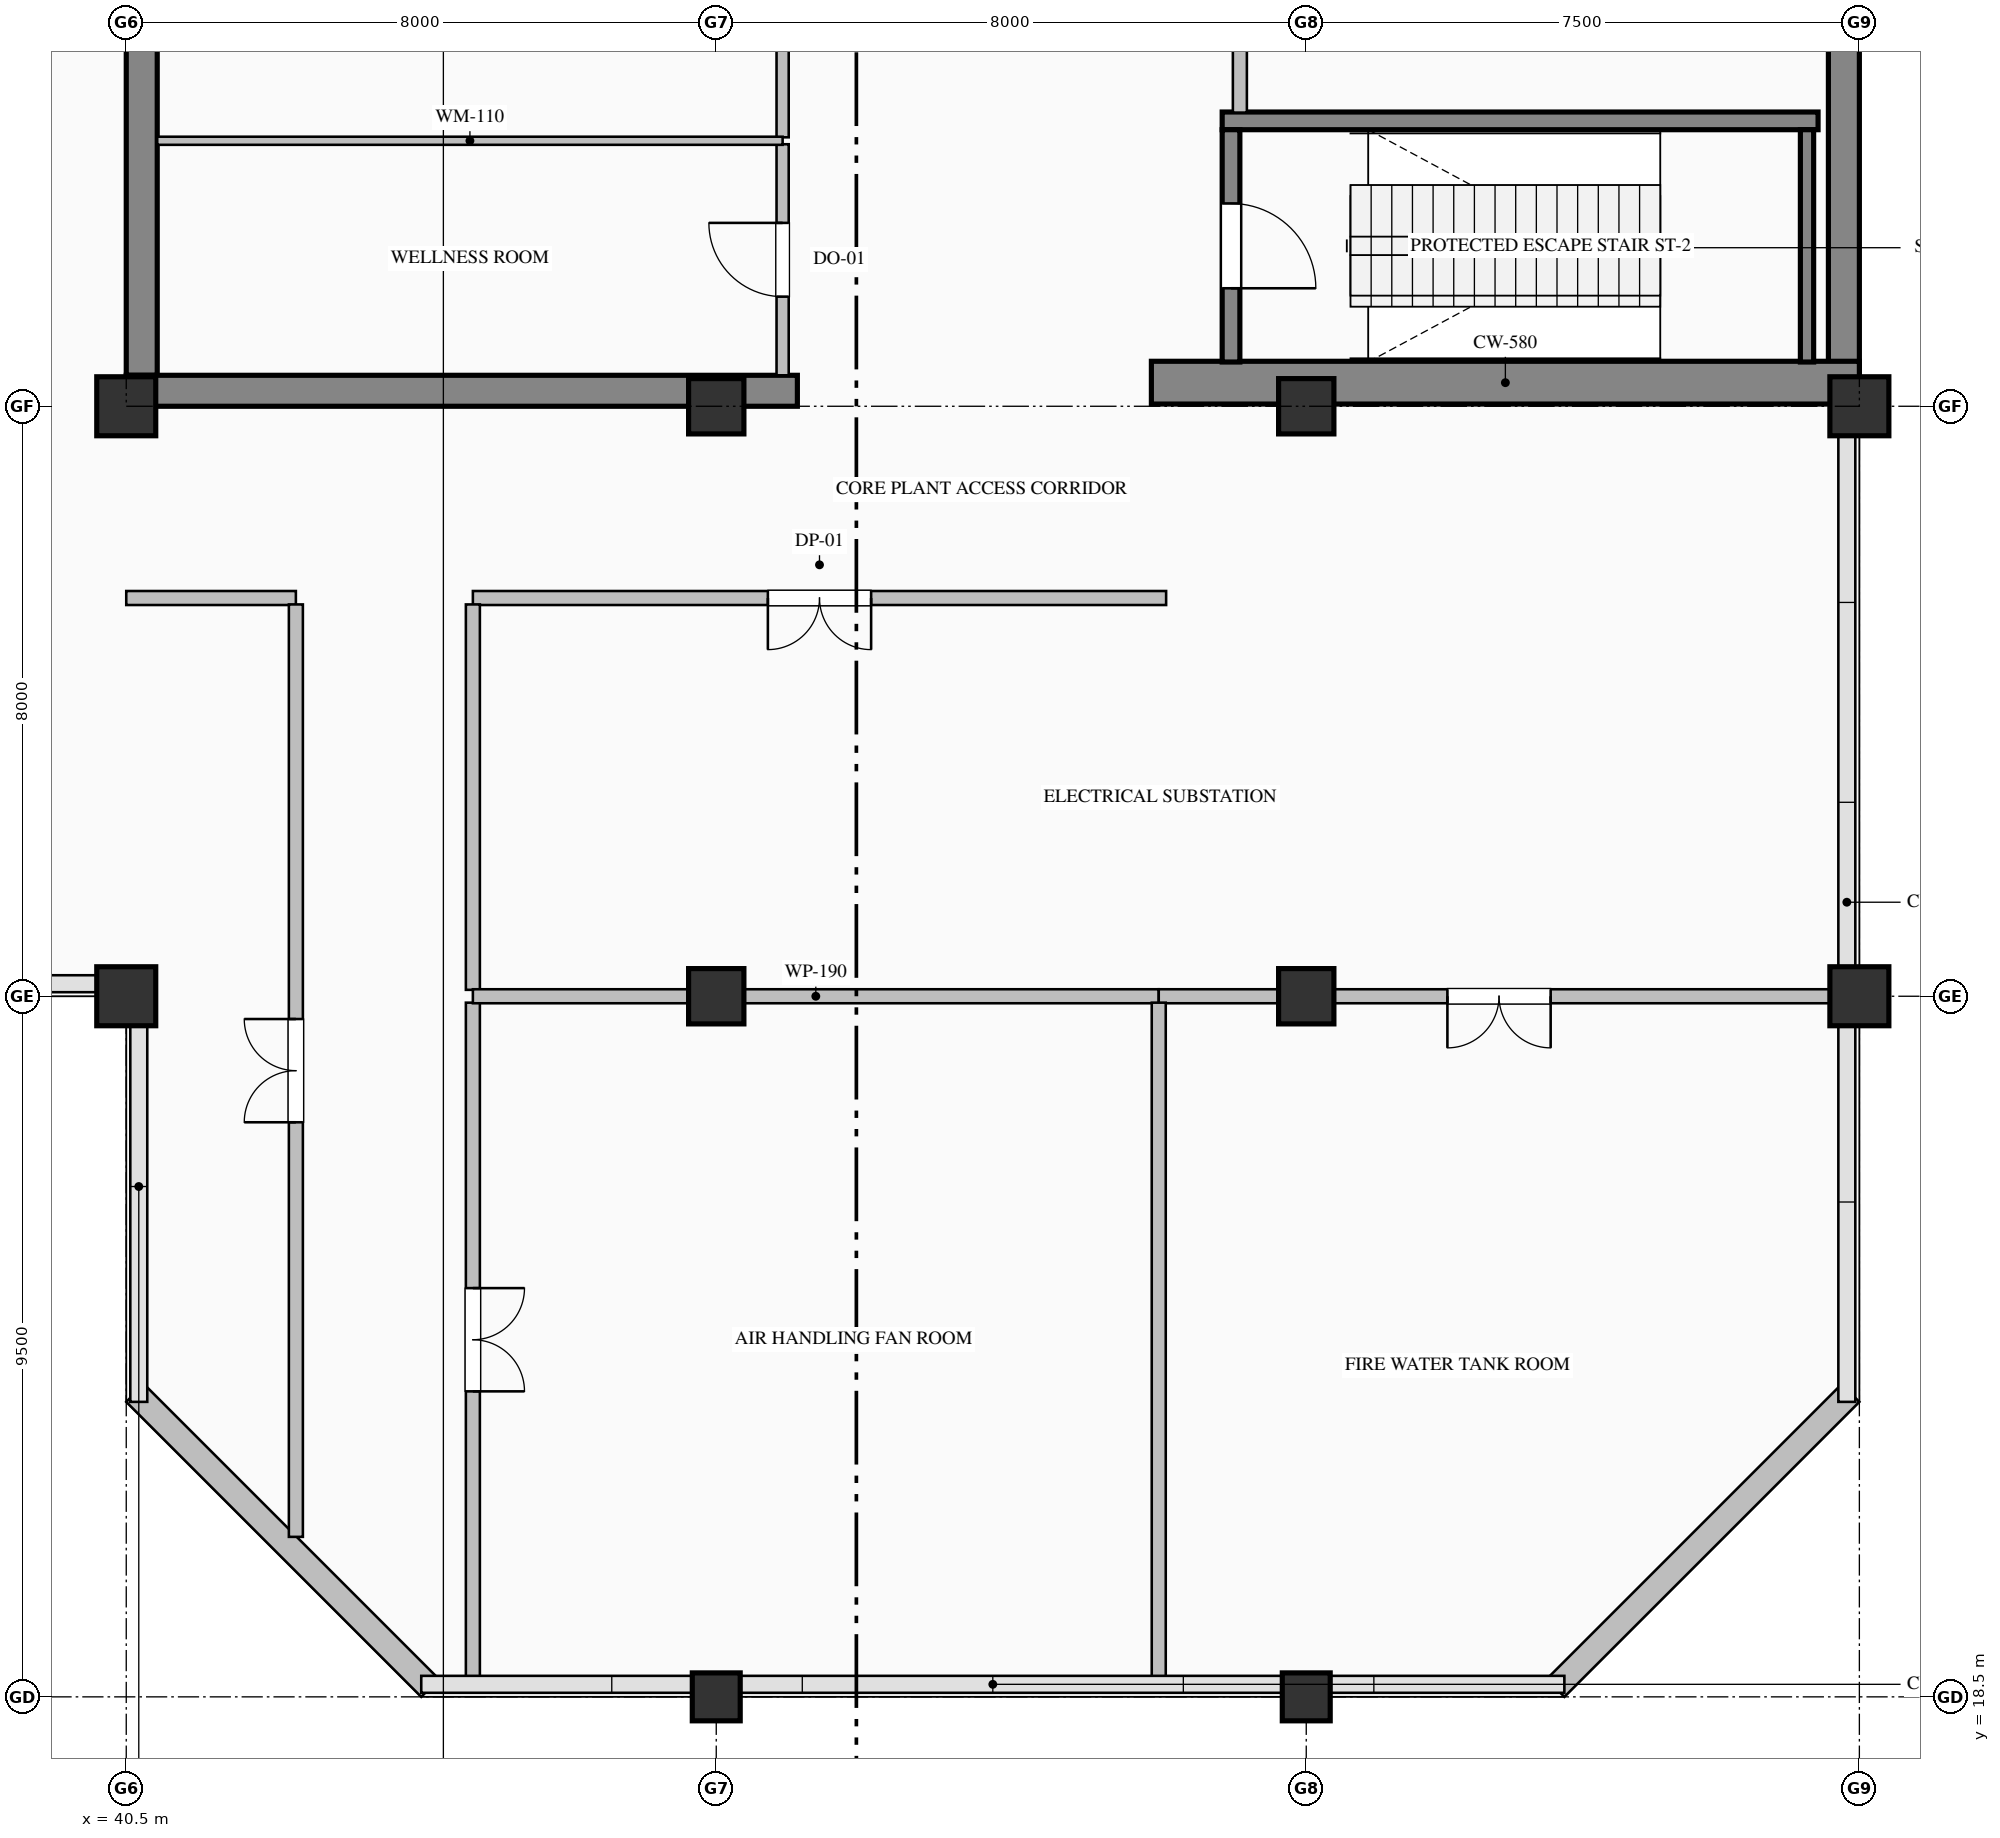
"""IFC4 building model, lengths in metres.
Left out: names, types, materials, properties, quantities, classifications, styles, units other than length and angle.
Written with IfcOpenShell. Run it as: python <this file> out.ifc"""

import sys

from ifc_helpers import new_model, si_unit, direction, frame, frame_2d, origin, origin_2d, place, context, subcontext, project, spatial, rectangle, hollow_rectangle, extrude, element, fill, save


model = new_model("IFC4")
c1 = context("Model", 3, precision=1e-05, world=origin(), true_north=direction((0.0, 1.0)))
c2 = subcontext(c1, "Body", "Model", "MODEL_VIEW")
j1 = project(units=[si_unit("LENGTHUNIT", "METRE"), si_unit("PLANEANGLEUNIT", "RADIAN")], contexts=[c1])
p1 = place(None, origin())
s1 = spatial("IfcSite", under=j1, at=p1, CompositionType="ELEMENT")
p2 = place(p1, origin())
s2 = spatial("IfcBuilding", under=s1, at=p2, CompositionType="ELEMENT")
p3 = place(p2, frame((0.0, 0.0, 367.2)))
s3 = spatial("IfcBuildingStorey", under=s2, at=p3, CompositionType="ELEMENT", Elevation=367.2)
p4 = place(p3, frame((63.79, 36.32, 0.0), z_axis=(0.0, 0.0, 1.0), x_axis=(0.0, 1.0, 0.0)))
e1 = element("IfcWall", 1, at=p4, inside=s3, PredefinedType="SHEAR", context=c2, shape_type="SweptSolid", body=[
    extrude(rectangle(XDim=15.26, YDim=0.42, at=frame_2d((7.63, 0.0))), origin(), (0.0, 0.0, 1.0), 5.39),
])
p5 = place(p3, frame((40.71, 36.42, 0.0), z_axis=(0.0, 0.0, 1.0), x_axis=(0.0, 1.0, 0.0)))
e2 = element("IfcWall", 2, at=p5, inside=s3, PredefinedType="SHEAR", context=c2, shape_type="SweptSolid", body=[
    extrude(rectangle(XDim=7.98, YDim=0.42, at=frame_2d((3.99, 0.0))), origin(), (0.0, 0.0, 1.0), 5.39),
])
p6 = place(p3, frame((40.5, 36.21, 0.0), z_axis=(0.0, 0.0, 1.0), x_axis=(1.0, 0.0, 0.0)))
e3 = element("IfcWall", 3, at=p6, inside=s3, PredefinedType="SHEAR", context=c2, shape_type="SweptSolid", body=[
    extrude(rectangle(XDim=9.1, YDim=0.42, at=frame_2d((4.55, 0.0))), origin(), (0.0, 0.0, 1.0), 5.39),
])
p7 = place(p3, frame((54.4, 36.32, 0.0), z_axis=(0.0, 0.0, 1.0), x_axis=(1.0, 0.0, 0.0)))
e4 = element("IfcWall", 4, at=p7, inside=s3, PredefinedType="SHEAR", context=c2, shape_type="SweptSolid", body=[
    extrude(rectangle(XDim=9.6, YDim=0.58, at=frame_2d((4.8, 0.0))), origin(), (0.0, 0.0, 1.0), 5.8),
])
for number, where, z_axis, x_axis in (
    (5, (40.5, 28.0, 0.0), (0.0, 0.0, 1.0), (1.0, 0.0, 0.0)),
    (6, (40.5, 36.0, 0.0), (0.0, 0.0, 1.0), (1.0, 0.0, 0.0)),
):
    element("IfcColumn", number, at=place(p3, frame(where, z_axis=z_axis, x_axis=x_axis)), inside=s3, PredefinedType="COLUMN", context=c2, shape_type="SweptSolid", body=[
        extrude(hollow_rectangle(XDim=0.8, YDim=0.8, WallThickness=0.032, at=origin_2d()), origin(), (0.0, 0.0, 1.0), 5.8),
    ])
p8 = place(p3, frame((48.5, 18.5, 0.0), z_axis=(0.0, 0.0, 1.0), x_axis=(1.0, 0.0, 0.0)))
e7 = element("IfcColumn", 7, at=p8, inside=s3, PredefinedType="COLUMN", context=c2, shape_type="SweptSolid", body=[
    extrude(hollow_rectangle(XDim=0.65, YDim=0.65, WallThickness=0.028, at=origin_2d()), origin(), (0.0, 0.0, 1.0), 5.8),
])
for number, where, z_axis, x_axis in (
    (8, (48.5, 28.0, 0.0), (0.0, 0.0, 1.0), (1.0, 0.0, 0.0)),
    (9, (48.5, 36.0, 0.0), (0.0, 0.0, 1.0), (1.0, 0.0, 0.0)),
):
    element("IfcColumn", number, at=place(p3, frame(where, z_axis=z_axis, x_axis=x_axis)), inside=s3, PredefinedType="COLUMN", context=c2, shape_type="SweptSolid", body=[
        extrude(rectangle(XDim=0.75, YDim=0.75, at=origin_2d()), origin(), (0.0, 0.0, 1.0), 5.8),
    ])
p9 = place(p3, frame((56.5, 18.5, 0.0), z_axis=(0.0, 0.0, 1.0), x_axis=(1.0, 0.0, 0.0)))
e10 = element("IfcColumn", 10, at=p9, inside=s3, PredefinedType="COLUMN", context=c2, shape_type="SweptSolid", body=[
    extrude(hollow_rectangle(XDim=0.65, YDim=0.65, WallThickness=0.028, at=origin_2d()), origin(), (0.0, 0.0, 1.0), 5.8),
])
for number, where, z_axis, x_axis in (
    (11, (56.5, 28.0, 0.0), (0.0, 0.0, 1.0), (1.0, 0.0, 0.0)),
    (12, (56.5, 36.0, 0.0), (0.0, 0.0, 1.0), (1.0, 0.0, 0.0)),
):
    element("IfcColumn", number, at=place(p3, frame(where, z_axis=z_axis, x_axis=x_axis)), inside=s3, PredefinedType="COLUMN", context=c2, shape_type="SweptSolid", body=[
        extrude(rectangle(XDim=0.75, YDim=0.75, at=origin_2d()), origin(), (0.0, 0.0, 1.0), 5.8),
    ])
for number, where, z_axis, x_axis in (
    (13, (64.0, 28.0, 0.0), (0.0, 0.0, 1.0), (1.0, 0.0, 0.0)),
    (14, (64.0, 36.0, 0.0), (0.0, 0.0, 1.0), (1.0, 0.0, 0.0)),
):
    element("IfcColumn", number, at=place(p3, frame(where, z_axis=z_axis, x_axis=x_axis)), inside=s3, PredefinedType="COLUMN", context=c2, shape_type="SweptSolid", body=[
        extrude(hollow_rectangle(XDim=0.8, YDim=0.8, WallThickness=0.032, at=origin_2d()), origin(), (0.0, 0.0, 1.0), 5.8),
    ])
for number, where, z_axis, x_axis in (
    (15, (63.88, 22.62, 0.0), (0.0, 0.0, 1.0), (-0.707, -0.707, 0.0)),
    (16, (44.62, 18.62, 0.0), (0.0, 0.0, 1.0), (-0.707, 0.707, 0.0)),
):
    element("IfcWall", number, at=place(p3, frame(where, z_axis=z_axis, x_axis=x_axis)), inside=s3, PredefinedType="SOLIDWALL", context=c2, shape_type="SweptSolid", body=[
        extrude(rectangle(XDim=5.657, YDim=0.34, at=frame_2d((2.828, 0.0))), origin(), (0.0, 0.0, 1.0), 5.39),
    ])
p10 = place(p3, frame((55.36, 39.87, 0.0), z_axis=(0.0, 0.0, 1.0), x_axis=(1.0, 0.0, 0.0)))
e17 = element("IfcWall", 17, at=p10, inside=s3, PredefinedType="SOLIDWALL", context=c2, shape_type="SweptSolid", body=[
    extrude(rectangle(XDim=8.08, YDim=0.24, at=frame_2d((4.04, 0.0))), origin(), (0.0, 0.0, 1.0), 5.8),
])
p11 = place(p3, frame((55.48, 39.75, 0.0), z_axis=(0.0, 0.0, 1.0), x_axis=(0.0, -1.0, 0.0)))
e18 = element("IfcWall", 18, at=p11, inside=s3, PredefinedType="SOLIDWALL", context=c2, shape_type="SweptSolid", body=[
    extrude(rectangle(XDim=3.15, YDim=0.24, at=frame_2d((1.575, 0.0))), origin(), (0.0, 0.0, 1.0), 5.8),
])
p12 = place(p11, frame((1.0, 0.0, 0.0)))
e19 = element("IfcOpeningElement", 19, at=p12, cuts=e18, PredefinedType="OPENING", context=c2, shape_type="SweptSolid", body=[
    extrude(rectangle(XDim=1.15, YDim=2.2, at=frame_2d((0.575, 1.1))), frame((0.0, 0.13, 0.0), z_axis=(0.0, -1.0, 0.0), x_axis=(1.0, 0.0, 0.0)), (0.0, 0.0, 1.0), 0.26),
])
p13 = place(p3, frame((63.29, 36.6, 0.0), z_axis=(0.0, 0.0, 1.0), x_axis=(0.0, 1.0, 0.0)))
e20 = element("IfcWall", 20, at=p13, inside=s3, PredefinedType="SOLIDWALL", context=c2, shape_type="SweptSolid", body=[
    extrude(rectangle(XDim=3.15, YDim=0.18, at=frame_2d((1.575, 0.0))), origin(), (0.0, 0.0, 1.0), 5.8),
])
p14 = place(p3, frame((49.4, 36.42, 0.0), z_axis=(0.0, 0.0, 1.0), x_axis=(0.0, 1.0, 0.0)))
e21 = element("IfcWall", 21, at=p14, inside=s3, PredefinedType="PARTITIONING", context=c2, shape_type="SweptSolid", body=[
    extrude(rectangle(XDim=3.133, YDim=0.165, at=frame_2d((1.566, 0.0))), origin(), (0.0, 0.0, 1.0), 4.632),
])
p15 = place(p14, frame((1.066, 0.0, 0.0)))
e22 = element("IfcOpeningElement", 22, at=p15, cuts=e21, PredefinedType="OPENING", context=c2, shape_type="SweptSolid", body=[
    extrude(rectangle(XDim=1.0, YDim=2.15, at=frame_2d((0.5, 1.075))), frame((0.0, 0.093, 0.0), z_axis=(0.0, -1.0, 0.0), x_axis=(1.0, 0.0, 0.0)), (0.0, 0.0, 1.0), 0.185),
])
p16 = place(p3, frame((49.4, 39.647, 0.0), z_axis=(0.0, 0.0, 1.0), x_axis=(0.0, 1.0, 0.0)))
e23 = element("IfcWall", 23, at=p16, inside=s3, PredefinedType="PARTITIONING", context=c2, shape_type="SweptSolid", body=[
    extrude(rectangle(XDim=4.503, YDim=0.165, at=frame_2d((2.251, 0.0))), origin(), (0.0, 0.0, 1.0), 4.632),
])
p17 = place(p16, frame((1.802, 0.0, 0.0)))
e24 = element("IfcOpeningElement", 24, at=p17, cuts=e23, PredefinedType="OPENING", context=c2, shape_type="SweptSolid", body=[
    extrude(rectangle(XDim=0.9, YDim=2.15, at=frame_2d((0.45, 1.075))), frame((0.0, 0.093, 0.0), z_axis=(0.0, -1.0, 0.0), x_axis=(1.0, 0.0, 0.0)), (0.0, 0.0, 1.0), 0.185),
])
p18 = place(p3, frame((55.6, 42.713, 0.0), z_axis=(0.0, 0.0, 1.0), x_axis=(0.0, -1.0, 0.0)))
e25 = element("IfcWall", 25, at=p18, inside=s3, PredefinedType="PARTITIONING", context=c2, shape_type="SweptSolid", body=[
    extrude(rectangle(XDim=2.731, YDim=0.19, at=frame_2d((1.365, 0.0))), origin(), (0.0, 0.0, 1.0), 5.39),
])
p19 = place(p3, frame((40.92, 39.6, 0.0), z_axis=(0.0, 0.0, 1.0), x_axis=(1.0, 0.0, 0.0)))
e26 = element("IfcWall", 26, at=p19, inside=s3, PredefinedType="MOVABLE", context=c2, shape_type="SweptSolid", body=[
    extrude(rectangle(XDim=8.48, YDim=0.11, at=frame_2d((4.24, 0.0))), origin(), (0.0, 0.0, 1.0), 5.39),
])
p20 = place(p3, frame((54.6, 33.4, 0.0), z_axis=(0.0, 0.0, 1.0), x_axis=(-1.0, 0.0, 0.0)))
e27 = element("IfcWall", 27, at=p20, inside=s3, PredefinedType="PARTITIONING", context=c2, shape_type="SweptSolid", body=[
    extrude(rectangle(XDim=9.4, YDim=0.19, at=frame_2d((4.7, 0.0))), origin(), (0.0, 0.0, 1.0), 5.39),
])
p21 = place(p20, frame((4.0, 0.0, 0.0)))
e28 = element("IfcOpeningElement", 28, at=p21, cuts=e27, PredefinedType="OPENING", context=c2, shape_type="SweptSolid", body=[
    extrude(rectangle(XDim=1.4, YDim=2.25, at=frame_2d((0.7, 1.125))), frame((0.0, 0.105, 0.0), z_axis=(0.0, -1.0, 0.0), x_axis=(1.0, 0.0, 0.0)), (0.0, 0.0, 1.0), 0.21),
])
p22 = place(p3, frame((42.8, 33.4, 0.0), z_axis=(0.0, 0.0, 1.0), x_axis=(-1.0, 0.0, 0.0)))
e29 = element("IfcWall", 29, at=p22, inside=s3, PredefinedType="PARTITIONING", context=c2, shape_type="SweptSolid", body=[
    extrude(rectangle(XDim=2.3, YDim=0.19, at=frame_2d((1.15, 0.0))), origin(), (0.0, 0.0, 1.0), 5.39),
])
p23 = place(p3, frame((45.2, 33.313, 0.0), z_axis=(0.0, 0.0, 1.0), x_axis=(0.0, -1.0, 0.0)))
e30 = element("IfcWall", 30, at=p23, inside=s3, PredefinedType="PARTITIONING", context=c2, shape_type="SweptSolid", body=[
    extrude(rectangle(XDim=5.226, YDim=0.19, at=frame_2d((2.613, 0.0))), origin(), (0.0, 0.0, 1.0), 5.39),
])
p24 = place(p3, frame((45.2, 27.913, 0.0), z_axis=(0.0, 0.0, 1.0), x_axis=(0.0, -1.0, 0.0)))
e31 = element("IfcWall", 31, at=p24, inside=s3, PredefinedType="PARTITIONING", context=c2, shape_type="SweptSolid", body=[
    extrude(rectangle(XDim=9.141, YDim=0.19, at=frame_2d((4.571, 0.0))), origin(), (0.0, 0.0, 1.0), 5.39),
])
p25 = place(p24, frame((3.871, 0.0, 0.0)))
e32 = element("IfcOpeningElement", 32, at=p25, cuts=e31, PredefinedType="OPENING", context=c2, shape_type="SweptSolid", body=[
    extrude(rectangle(XDim=1.4, YDim=2.25, at=frame_2d((0.7, 1.125))), frame((0.0, 0.105, 0.0), z_axis=(0.0, -1.0, 0.0), x_axis=(1.0, 0.0, 0.0)), (0.0, 0.0, 1.0), 0.21),
])
p26 = place(p3, frame((42.8, 20.669, 0.0), z_axis=(0.0, 0.0, 1.0), x_axis=(0.0, 1.0, 0.0)))
e33 = element("IfcWall", 33, at=p26, inside=s3, PredefinedType="PARTITIONING", context=c2, shape_type="SweptSolid", body=[
    extrude(rectangle(XDim=12.644, YDim=0.19, at=frame_2d((6.322, 0.0))), origin(), (0.0, 0.0, 1.0), 5.39),
])
p27 = place(p26, frame((5.622, 0.0, 0.0)))
e34 = element("IfcOpeningElement", 34, at=p27, cuts=e33, PredefinedType="OPENING", context=c2, shape_type="SweptSolid", body=[
    extrude(rectangle(XDim=1.4, YDim=2.25, at=frame_2d((0.7, 1.125))), frame((0.0, 0.105, 0.0), z_axis=(0.0, -1.0, 0.0), x_axis=(1.0, 0.0, 0.0)), (0.0, 0.0, 1.0), 0.21),
])
p28 = place(p3, frame((54.5, 28.0, 0.0), z_axis=(0.0, 0.0, 1.0), x_axis=(-1.0, 0.0, 0.0)))
e35 = element("IfcWall", 35, at=p28, inside=s3, PredefinedType="PARTITIONING", context=c2, shape_type="SweptSolid", body=[
    extrude(rectangle(XDim=9.3, YDim=0.19, at=frame_2d((4.65, 0.0))), origin(), (0.0, 0.0, 1.0), 4.782),
])
p29 = place(p3, frame((63.728, 28.0, 0.0), z_axis=(0.0, 0.0, 1.0), x_axis=(-1.0, 0.0, 0.0)))
e36 = element("IfcWall", 36, at=p29, inside=s3, PredefinedType="PARTITIONING", context=c2, shape_type="SweptSolid", body=[
    extrude(rectangle(XDim=9.228, YDim=0.19, at=frame_2d((4.614, 0.0))), origin(), (0.0, 0.0, 1.0), 4.782),
])
p30 = place(p29, frame((3.914, 0.0, 0.0)))
e37 = element("IfcOpeningElement", 37, at=p30, cuts=e36, PredefinedType="OPENING", context=c2, shape_type="SweptSolid", body=[
    extrude(rectangle(XDim=1.4, YDim=2.25, at=frame_2d((0.7, 1.125))), frame((0.0, 0.105, 0.0), z_axis=(0.0, -1.0, 0.0), x_axis=(1.0, 0.0, 0.0)), (0.0, 0.0, 1.0), 0.21),
])
p31 = place(p3, frame((54.5, 27.913, 0.0), z_axis=(0.0, 0.0, 1.0), x_axis=(0.0, -1.0, 0.0)))
e38 = element("IfcWall", 38, at=p31, inside=s3, PredefinedType="PARTITIONING", context=c2, shape_type="SweptSolid", body=[
    extrude(rectangle(XDim=9.141, YDim=0.19, at=frame_2d((4.571, 0.0))), origin(), (0.0, 0.0, 1.0), 5.39),
])
p32 = place(p12, origin())
e39 = element("IfcDoor", 39, at=p32, inside=s3, OperationType="SINGLE_SWING_RIGHT", PredefinedType="DOOR", context=c2, shape_type="SweptSolid", body=[
    extrude(rectangle(XDim=1.15, YDim=2.2, at=frame_2d((0.575, 1.1))), frame((0.0, 0.025, 0.0), z_axis=(0.0, -1.0, 0.0), x_axis=(1.0, 0.0, 0.0)), (0.0, 0.0, 1.0), 0.05),
])
fill(e19, e39)
p33 = place(p15, origin())
e40 = element("IfcDoor", 40, at=p33, inside=s3, OperationType="SINGLE_SWING_RIGHT", PredefinedType="DOOR", context=c2, shape_type="SweptSolid", body=[
    extrude(rectangle(XDim=1.0, YDim=2.15, at=frame_2d((0.5, 1.075))), frame((0.0, 0.025, 0.0), z_axis=(0.0, -1.0, 0.0), x_axis=(1.0, 0.0, 0.0)), (0.0, 0.0, 1.0), 0.05),
])
fill(e22, e40)
p34 = place(p21, origin())
e41 = element("IfcDoor", 41, at=p34, inside=s3, OperationType="DOUBLE_DOOR_SINGLE_SWING", PredefinedType="DOOR", context=c2, shape_type="SweptSolid", body=[
    extrude(rectangle(XDim=1.4, YDim=2.25, at=frame_2d((0.7, 1.125))), frame((0.0, 0.025, 0.0), z_axis=(0.0, -1.0, 0.0), x_axis=(1.0, 0.0, 0.0)), (0.0, 0.0, 1.0), 0.05),
])
fill(e28, e41)
p35 = place(p25, origin())
e42 = element("IfcDoor", 42, at=p35, inside=s3, OperationType="DOUBLE_DOOR_SINGLE_SWING", PredefinedType="DOOR", context=c2, shape_type="SweptSolid", body=[
    extrude(rectangle(XDim=1.4, YDim=2.25, at=frame_2d((0.7, 1.125))), frame((0.0, 0.025, 0.0), z_axis=(0.0, -1.0, 0.0), x_axis=(1.0, 0.0, 0.0)), (0.0, 0.0, 1.0), 0.05),
])
fill(e32, e42)
p36 = place(p30, origin())
e43 = element("IfcDoor", 43, at=p36, inside=s3, OperationType="DOUBLE_DOOR_SINGLE_SWING", PredefinedType="DOOR", context=c2, shape_type="SweptSolid", body=[
    extrude(rectangle(XDim=1.4, YDim=2.25, at=frame_2d((0.7, 1.125))), frame((0.0, 0.025, 0.0), z_axis=(0.0, -1.0, 0.0), x_axis=(1.0, 0.0, 0.0)), (0.0, 0.0, 1.0), 0.05),
])
fill(e37, e43)
p37 = place(p27, origin())
e44 = element("IfcDoor", 44, at=p37, inside=s3, OperationType="DOUBLE_DOOR_SINGLE_SWING", PredefinedType="DOOR", context=c2, shape_type="SweptSolid", body=[
    extrude(rectangle(XDim=1.4, YDim=2.25, at=frame_2d((0.7, 1.125))), frame((0.0, 0.025, 0.0), z_axis=(0.0, -1.0, 0.0), x_axis=(1.0, 0.0, 0.0)), (0.0, 0.0, 1.0), 0.05),
])
fill(e34, e44)
save(model, sys.argv[1])
